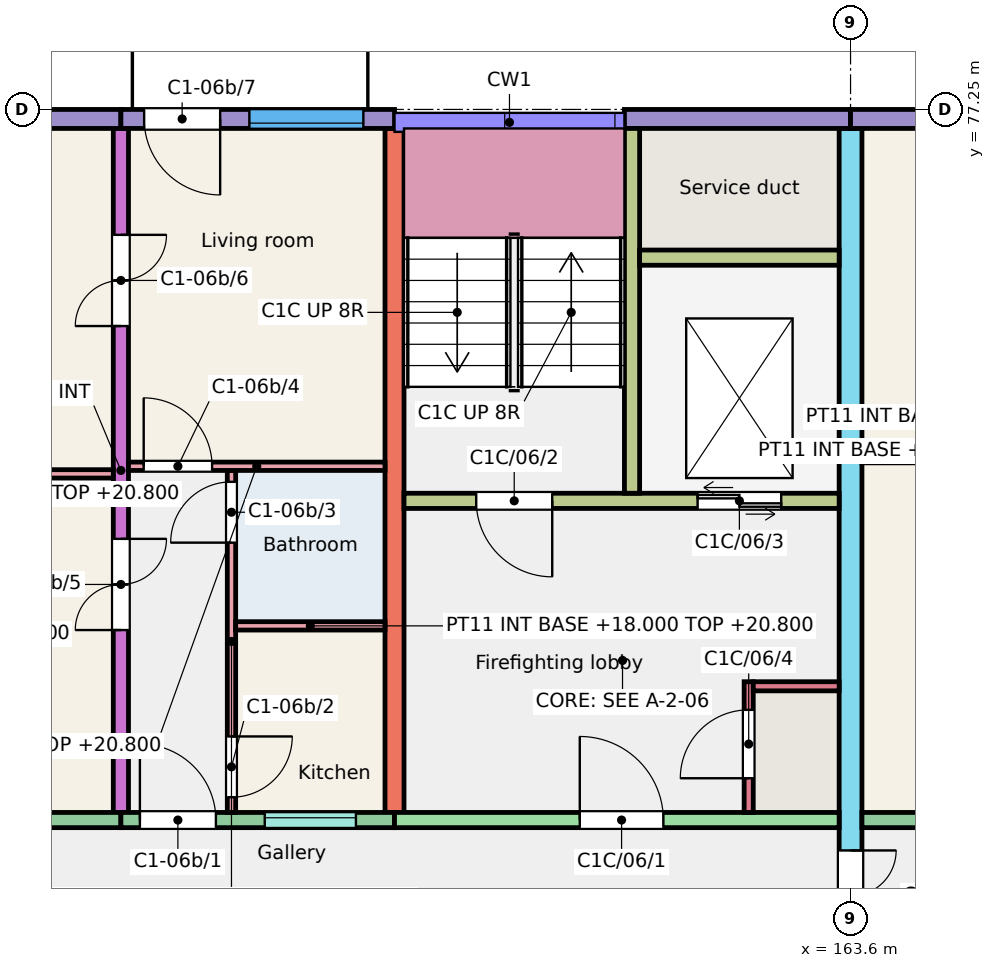
"""IFC4 building model, lengths in metres.
Left out: names, types, materials, properties, quantities, classifications, styles, units other than length and angle.
Written with IfcOpenShell. Run it as: python <this file> out.ifc"""

import sys

from ifc_helpers import new_model, si_unit, direction, frame, frame_2d, origin, place, context, subcontext, project, spatial, rectangle, extrude, element, fill, save


model = new_model("IFC4")
c1 = context("Model", 3, precision=1e-05, world=origin(), true_north=direction((0.0, 1.0)))
c2 = subcontext(c1, "Body", "Model", "MODEL_VIEW")
j1 = project(units=[si_unit("LENGTHUNIT", "METRE"), si_unit("PLANEANGLEUNIT", "RADIAN")], contexts=[c1])
p1 = place(None, origin())
s1 = spatial("IfcSite", under=j1, at=p1, CompositionType="ELEMENT")
p2 = place(p1, origin())
s2 = spatial("IfcBuilding", under=s1, at=p2, CompositionType="ELEMENT")
p3 = place(p2, frame((0.0, 0.0, 18.0)))
s3 = spatial("IfcBuildingStorey", under=s2, at=p3, CompositionType="ELEMENT", Elevation=18.0)
p4 = place(p3, frame((154.0, 68.0, 0.0), z_axis=(0.0, 0.0, 1.0), x_axis=(0.0, 1.0, 0.0)))
e1 = element("IfcWall", 1, at=p4, inside=s3, PredefinedType="SHEAR", context=c2, shape_type="SweptSolid", body=[
    extrude(rectangle(XDim=9.0, YDim=0.2, at=frame_2d((4.5, 0.0))), origin(), (0.0, 0.0, 1.0), 3.0),
])
p5 = place(p4, frame((2.4, 0.0, 0.0)))
e2 = element("IfcOpeningElement", 2, at=p5, cuts=e1, PredefinedType="OPENING", context=c2, shape_type="SweptSolid", body=[
    extrude(rectangle(XDim=1.2, YDim=2.1, at=frame_2d((0.6, 1.05))), frame((0.0, 0.11, 0.0), z_axis=(0.0, -1.0, 0.0), x_axis=(1.0, 0.0, 0.0)), (0.0, 0.0, 1.0), 0.22),
])
p6 = place(p4, frame((6.4, 0.0, 0.0)))
e3 = element("IfcOpeningElement", 3, at=p6, cuts=e1, PredefinedType="OPENING", context=c2, shape_type="SweptSolid", body=[
    extrude(rectangle(XDim=1.2, YDim=2.1, at=frame_2d((0.6, 1.05))), frame((0.0, 0.11, 0.0), z_axis=(0.0, -1.0, 0.0), x_axis=(1.0, 0.0, 0.0)), (0.0, 0.0, 1.0), 0.22),
])
p7 = place(p3, frame((157.6, 68.0, 0.0), z_axis=(0.0, 0.0, 1.0), x_axis=(0.0, 1.0, 0.0)))
e4 = element("IfcWall", 4, at=p7, inside=s3, PredefinedType="SHEAR", context=c2, shape_type="SweptSolid", body=[
    extrude(rectangle(XDim=9.0, YDim=0.25, at=frame_2d((4.5, 0.0))), origin(), (0.0, 0.0, 1.0), 3.0),
])
p8 = place(p3, frame((163.6, 66.0, 0.0), z_axis=(0.0, 0.0, 1.0), x_axis=(0.0, 1.0, 0.0)))
e5 = element("IfcWall", 5, at=p8, inside=s3, PredefinedType="SHEAR", context=c2, shape_type="SweptSolid", body=[
    extrude(rectangle(XDim=11.0, YDim=0.3, at=frame_2d((5.5, 0.0))), origin(), (0.0, 0.0, 1.0), 3.0),
])
p9 = place(p8, frame((0.3, 0.0, 0.0)))
e6 = element("IfcOpeningElement", 6, at=p9, cuts=e5, PredefinedType="OPENING", context=c2, shape_type="SweptSolid", body=[
    extrude(rectangle(XDim=1.2, YDim=2.1, at=frame_2d((0.6, 1.05))), frame((0.0, 0.16, 0.0), z_axis=(0.0, -1.0, 0.0), x_axis=(1.0, 0.0, 0.0)), (0.0, 0.0, 1.0), 0.32),
])
p10 = place(p3, frame((150.4, 77.125, 0.0), z_axis=(0.0, 0.0, 1.0), x_axis=(1.0, 0.0, 0.0)))
e7 = element("IfcWall", 7, at=p10, inside=s3, PredefinedType="SOLIDWALL", context=c2, shape_type="SweptSolid", body=[
    extrude(rectangle(XDim=3.6, YDim=0.25, at=frame_2d((1.8, 0.0))), origin(), (0.0, 0.0, 1.0), 3.0),
])
p11 = place(p10, frame((1.05, 0.0, 0.9)))
e8 = element("IfcOpeningElement", 8, at=p11, cuts=e7, PredefinedType="OPENING", context=c2, shape_type="SweptSolid", body=[
    extrude(rectangle(XDim=1.5, YDim=1.5, at=frame_2d((0.75, 0.75))), frame((0.0, 0.135, 0.0), z_axis=(0.0, -1.0, 0.0), x_axis=(1.0, 0.0, 0.0)), (0.0, 0.0, 1.0), 0.27),
])
p12 = place(p3, frame((150.4, 67.9, 0.0), z_axis=(0.0, 0.0, 1.0), x_axis=(1.0, 0.0, 0.0)))
e9 = element("IfcWall", 9, at=p12, inside=s3, PredefinedType="SOLIDWALL", context=c2, shape_type="SweptSolid", body=[
    extrude(rectangle(XDim=3.6, YDim=0.2, at=frame_2d((1.8, 0.0))), origin(), (0.0, 0.0, 1.0), 3.0),
])
p13 = place(p12, frame((1.05, 0.0, 0.9)))
e10 = element("IfcOpeningElement", 10, at=p13, cuts=e9, PredefinedType="OPENING", context=c2, shape_type="SweptSolid", body=[
    extrude(rectangle(XDim=1.5, YDim=1.5, at=frame_2d((0.75, 0.75))), frame((0.0, 0.11, 0.0), z_axis=(0.0, -1.0, 0.0), x_axis=(1.0, 0.0, 0.0)), (0.0, 0.0, 1.0), 0.22),
])
p14 = place(p3, frame((154.0, 77.125, 0.0), z_axis=(0.0, 0.0, 1.0), x_axis=(1.0, 0.0, 0.0)))
e11 = element("IfcWall", 11, at=p14, inside=s3, PredefinedType="SOLIDWALL", context=c2, shape_type="SweptSolid", body=[
    extrude(rectangle(XDim=3.6, YDim=0.25, at=frame_2d((1.8, 0.0))), origin(), (0.0, 0.0, 1.0), 3.0),
])
p15 = place(p14, frame((1.69, 0.0, 0.9)))
e12 = element("IfcOpeningElement", 12, at=p15, cuts=e11, PredefinedType="OPENING", context=c2, shape_type="SweptSolid", body=[
    extrude(rectangle(XDim=1.5, YDim=1.5, at=frame_2d((0.75, 0.75))), frame((0.0, 0.135, 0.0), z_axis=(0.0, -1.0, 0.0), x_axis=(1.0, 0.0, 0.0)), (0.0, 0.0, 1.0), 0.27),
])
p16 = place(p14, frame((0.306, 0.0, 0.0)))
e13 = element("IfcOpeningElement", 13, at=p16, cuts=e11, PredefinedType="OPENING", context=c2, shape_type="SweptSolid", body=[
    extrude(rectangle(XDim=1.0, YDim=2.1, at=frame_2d((0.5, 1.05))), frame((0.0, 0.135, 0.0), z_axis=(0.0, -1.0, 0.0), x_axis=(1.0, 0.0, 0.0)), (0.0, 0.0, 1.0), 0.27),
])
p17 = place(p3, frame((154.0, 67.9, 0.0), z_axis=(0.0, 0.0, 1.0), x_axis=(1.0, 0.0, 0.0)))
e14 = element("IfcWall", 14, at=p17, inside=s3, PredefinedType="SOLIDWALL", context=c2, shape_type="SweptSolid", body=[
    extrude(rectangle(XDim=3.6, YDim=0.2, at=frame_2d((1.8, 0.0))), origin(), (0.0, 0.0, 1.0), 3.0),
])
p18 = place(p17, frame((1.893, 0.0, 1.1)))
e15 = element("IfcOpeningElement", 15, at=p18, cuts=e14, PredefinedType="OPENING", context=c2, shape_type="SweptSolid", body=[
    extrude(rectangle(XDim=1.2, YDim=1.3, at=frame_2d((0.6, 0.65))), frame((0.0, 0.11, 0.0), z_axis=(0.0, -1.0, 0.0), x_axis=(1.0, 0.0, 0.0)), (0.0, 0.0, 1.0), 0.22),
])
p19 = place(p17, frame((0.25, 0.0, 0.0)))
e16 = element("IfcOpeningElement", 16, at=p19, cuts=e14, PredefinedType="OPENING", context=c2, shape_type="SweptSolid", body=[
    extrude(rectangle(XDim=1.0, YDim=2.1, at=frame_2d((0.5, 1.05))), frame((0.0, 0.11, 0.0), z_axis=(0.0, -1.0, 0.0), x_axis=(1.0, 0.0, 0.0)), (0.0, 0.0, 1.0), 0.22),
])
p20 = place(p3, frame((160.625, 77.125, 0.0), z_axis=(0.0, 0.0, 1.0), x_axis=(1.0, 0.0, 0.0)))
e17 = element("IfcWall", 17, at=p20, inside=s3, PredefinedType="SOLIDWALL", context=c2, shape_type="SweptSolid", body=[
    extrude(rectangle(XDim=2.975, YDim=0.25, at=frame_2d((1.488, 0.0))), origin(), (0.0, 0.0, 1.0), 3.0),
])
p21 = place(p3, frame((157.6, 67.9, 0.0), z_axis=(0.0, 0.0, 1.0), x_axis=(1.0, 0.0, 0.0)))
e18 = element("IfcWall", 18, at=p21, inside=s3, PredefinedType="SHEAR", context=c2, shape_type="SweptSolid", body=[
    extrude(rectangle(XDim=5.85, YDim=0.2, at=frame_2d((2.925, 0.0))), origin(), (0.0, 0.0, 1.0), 3.0),
])
p22 = place(p21, frame((2.438, 0.0, 0.0)))
e19 = element("IfcOpeningElement", 19, at=p22, cuts=e18, PredefinedType="OPENING", context=c2, shape_type="SweptSolid", body=[
    extrude(rectangle(XDim=1.1, YDim=2.1, at=frame_2d((0.55, 1.05))), frame((0.0, 0.11, 0.0), z_axis=(0.0, -1.0, 0.0), x_axis=(1.0, 0.0, 0.0)), (0.0, 0.0, 1.0), 0.22),
])
p23 = place(p3, frame((157.725, 72.1, 0.0), z_axis=(0.0, 0.0, 1.0), x_axis=(1.0, 0.0, 0.0)))
e20 = element("IfcWall", 20, at=p23, inside=s3, PredefinedType="SHEAR", context=c2, shape_type="SweptSolid", body=[
    extrude(rectangle(XDim=5.725, YDim=0.2, at=frame_2d((2.862, 0.0))), origin(), (0.0, 0.0, 1.0), 3.0),
])
p24 = place(p23, frame((0.95, 0.0, 0.0)))
e21 = element("IfcOpeningElement", 21, at=p24, cuts=e20, PredefinedType="OPENING", context=c2, shape_type="SweptSolid", body=[
    extrude(rectangle(XDim=1.0, YDim=2.1, at=frame_2d((0.5, 1.05))), frame((0.0, 0.11, 0.0), z_axis=(0.0, -1.0, 0.0), x_axis=(1.0, 0.0, 0.0)), (0.0, 0.0, 1.0), 0.22),
])
p25 = place(p23, frame((3.863, 0.0, 0.0)))
e22 = element("IfcOpeningElement", 22, at=p25, cuts=e20, PredefinedType="OPENING", context=c2, shape_type="SweptSolid", body=[
    extrude(rectangle(XDim=1.1, YDim=2.1, at=frame_2d((0.55, 1.05))), frame((0.0, 0.11, 0.0), z_axis=(0.0, -1.0, 0.0), x_axis=(1.0, 0.0, 0.0)), (0.0, 0.0, 1.0), 0.22),
])
p26 = place(p3, frame((160.725, 72.2, 0.0), z_axis=(0.0, 0.0, 1.0), x_axis=(0.0, 1.0, 0.0)))
e23 = element("IfcWall", 23, at=p26, inside=s3, PredefinedType="SHEAR", context=c2, shape_type="SweptSolid", body=[
    extrude(rectangle(XDim=4.8, YDim=0.2, at=frame_2d((2.4, 0.0))), origin(), (0.0, 0.0, 1.0), 3.0),
])
p27 = place(p3, frame((160.825, 75.3, 0.0), z_axis=(0.0, 0.0, 1.0), x_axis=(1.0, 0.0, 0.0)))
e24 = element("IfcWall", 24, at=p27, inside=s3, PredefinedType="SHEAR", context=c2, shape_type="SweptSolid", body=[
    extrude(rectangle(XDim=2.625, YDim=0.2, at=frame_2d((1.312, 0.0))), origin(), (0.0, 0.0, 1.0), 3.0),
])
p28 = place(p3, frame((162.26, 68.0, 0.0), z_axis=(0.0, 0.0, 1.0), x_axis=(0.0, 1.0, 0.0)))
e25 = element("IfcWall", 25, at=p28, inside=s3, PredefinedType="SHEAR", context=c2, shape_type="SweptSolid", body=[
    extrude(rectangle(XDim=1.72, YDim=0.12, at=frame_2d((0.86, 0.0))), origin(), (0.0, 0.0, 1.0), 3.0),
])
p29 = place(p28, frame((0.45, 0.0, 0.0)))
e26 = element("IfcOpeningElement", 26, at=p29, cuts=e25, PredefinedType="OPENING", context=c2, shape_type="SweptSolid", body=[
    extrude(rectangle(XDim=0.9, YDim=2.1, at=frame_2d((0.45, 1.05))), frame((0.0, 0.07, 0.0), z_axis=(0.0, -1.0, 0.0), x_axis=(1.0, 0.0, 0.0)), (0.0, 0.0, 1.0), 0.14),
])
p30 = place(p3, frame((162.32, 69.66, 0.0), z_axis=(0.0, 0.0, 1.0), x_axis=(1.0, 0.0, 0.0)))
e27 = element("IfcWall", 27, at=p30, inside=s3, PredefinedType="SHEAR", context=c2, shape_type="SweptSolid", body=[
    extrude(rectangle(XDim=1.13, YDim=0.12, at=frame_2d((0.565, 0.0))), origin(), (0.0, 0.0, 1.0), 3.0),
])
p31 = place(p3, frame((163.6, 77.125, 0.0), z_axis=(0.0, 0.0, 1.0), x_axis=(1.0, 0.0, 0.0)))
e28 = element("IfcWall", 28, at=p31, inside=s3, PredefinedType="SOLIDWALL", context=c2, shape_type="SweptSolid", body=[
    extrude(rectangle(XDim=3.6, YDim=0.25, at=frame_2d((1.8, 0.0))), origin(), (0.0, 0.0, 1.0), 3.0),
])
p32 = place(p31, frame((1.075, 0.0, 0.9)))
e29 = element("IfcOpeningElement", 29, at=p32, cuts=e28, PredefinedType="OPENING", context=c2, shape_type="SweptSolid", body=[
    extrude(rectangle(XDim=1.5, YDim=1.5, at=frame_2d((0.75, 0.75))), frame((0.0, 0.135, 0.0), z_axis=(0.0, -1.0, 0.0), x_axis=(1.0, 0.0, 0.0)), (0.0, 0.0, 1.0), 0.27),
])
p33 = place(p3, frame((163.75, 67.9, 0.0), z_axis=(0.0, 0.0, 1.0), x_axis=(1.0, 0.0, 0.0)))
e30 = element("IfcWall", 30, at=p33, inside=s3, PredefinedType="SOLIDWALL", context=c2, shape_type="SweptSolid", body=[
    extrude(rectangle(XDim=3.45, YDim=0.2, at=frame_2d((1.725, 0.0))), origin(), (0.0, 0.0, 1.0), 3.0),
])
p34 = place(p33, frame((0.925, 0.0, 0.9)))
e31 = element("IfcOpeningElement", 31, at=p34, cuts=e30, PredefinedType="OPENING", context=c2, shape_type="SweptSolid", body=[
    extrude(rectangle(XDim=1.5, YDim=1.5, at=frame_2d((0.75, 0.75))), frame((0.0, 0.11, 0.0), z_axis=(0.0, -1.0, 0.0), x_axis=(1.0, 0.0, 0.0)), (0.0, 0.0, 1.0), 0.22),
])
p35 = place(p3, frame((155.455, 68.0, 0.0), z_axis=(0.0, 0.0, 1.0), x_axis=(0.0, 1.0, 0.0)))
e32 = element("IfcWall", 32, at=p35, inside=s3, PredefinedType="PARTITIONING", context=c2, shape_type="SweptSolid", body=[
    extrude(rectangle(XDim=4.5, YDim=0.11, at=frame_2d((2.25, 0.0))), origin(), (0.0, 0.0, 1.0), 2.8),
])
p36 = place(p35, frame((0.2, 0.0, 0.0)))
e33 = element("IfcOpeningElement", 33, at=p36, cuts=e32, PredefinedType="OPENING", context=c2, shape_type="SweptSolid", body=[
    extrude(rectangle(XDim=0.8, YDim=2.1, at=frame_2d((0.4, 1.05))), frame((0.0, 0.065, 0.0), z_axis=(0.0, -1.0, 0.0), x_axis=(1.0, 0.0, 0.0)), (0.0, 0.0, 1.0), 0.13),
])
p37 = place(p35, frame((3.55, 0.0, 0.0)))
e34 = element("IfcOpeningElement", 34, at=p37, cuts=e32, PredefinedType="OPENING", context=c2, shape_type="SweptSolid", body=[
    extrude(rectangle(XDim=0.8, YDim=2.1, at=frame_2d((0.4, 1.05))), frame((0.0, 0.065, 0.0), z_axis=(0.0, -1.0, 0.0), x_axis=(1.0, 0.0, 0.0)), (0.0, 0.0, 1.0), 0.13),
])
p38 = place(p3, frame((155.51, 70.455, 0.0), z_axis=(0.0, 0.0, 1.0), x_axis=(1.0, 0.0, 0.0)))
e35 = element("IfcWall", 35, at=p38, inside=s3, PredefinedType="PARTITIONING", context=c2, shape_type="SweptSolid", body=[
    extrude(rectangle(XDim=1.965, YDim=0.11, at=frame_2d((0.982, 0.0))), origin(), (0.0, 0.0, 1.0), 2.8),
])
p39 = place(p3, frame((154.1, 72.555, 0.0), z_axis=(0.0, 0.0, 1.0), x_axis=(1.0, 0.0, 0.0)))
e36 = element("IfcWall", 36, at=p39, inside=s3, PredefinedType="PARTITIONING", context=c2, shape_type="SweptSolid", body=[
    extrude(rectangle(XDim=3.375, YDim=0.11, at=frame_2d((1.688, 0.0))), origin(), (0.0, 0.0, 1.0), 2.8),
])
p40 = place(p39, frame((0.2, 0.0, 0.0)))
e37 = element("IfcOpeningElement", 37, at=p40, cuts=e36, PredefinedType="OPENING", context=c2, shape_type="SweptSolid", body=[
    extrude(rectangle(XDim=0.9, YDim=2.1, at=frame_2d((0.45, 1.05))), frame((0.0, 0.065, 0.0), z_axis=(0.0, -1.0, 0.0), x_axis=(1.0, 0.0, 0.0)), (0.0, 0.0, 1.0), 0.13),
])
p41 = place(p3, frame((150.5, 72.455, 0.0), z_axis=(0.0, 0.0, 1.0), x_axis=(1.0, 0.0, 0.0)))
e38 = element("IfcWall", 38, at=p41, inside=s3, PredefinedType="PARTITIONING", context=c2, shape_type="SweptSolid", body=[
    extrude(rectangle(XDim=3.4, YDim=0.11, at=frame_2d((1.7, 0.0))), origin(), (0.0, 0.0, 1.0), 2.8),
])
p42 = place(p3, frame((163.75, 72.655, 0.0), z_axis=(0.0, 0.0, 1.0), x_axis=(1.0, 0.0, 0.0)))
e39 = element("IfcWall", 39, at=p42, inside=s3, PredefinedType="PARTITIONING", context=c2, shape_type="SweptSolid", body=[
    extrude(rectangle(XDim=3.35, YDim=0.11, at=frame_2d((1.675, 0.0))), origin(), (0.0, 0.0, 1.0), 2.75),
])
p43 = place(p18, origin())
e40 = element("IfcWindow", 40, at=p43, inside=s3, PartitioningType="SINGLE_PANEL", PredefinedType="WINDOW", context=c2, shape_type="SweptSolid", body=[
    extrude(rectangle(XDim=1.2, YDim=1.3, at=frame_2d((0.6, 0.65))), frame((0.0, 0.06, 0.0), z_axis=(0.0, -1.0, 0.0), x_axis=(1.0, 0.0, 0.0)), (0.0, 0.0, 1.0), 0.06),
])
fill(e15, e40)
p44 = place(p15, origin())
e41 = element("IfcWindow", 41, at=p44, inside=s3, PartitioningType="SINGLE_PANEL", PredefinedType="WINDOW", context=c2, shape_type="SweptSolid", body=[
    extrude(rectangle(XDim=1.5, YDim=1.5, at=frame_2d((0.75, 0.75))), frame((0.0, -0.025, 0.0), z_axis=(0.0, -1.0, 0.0), x_axis=(1.0, 0.0, 0.0)), (0.0, 0.0, 1.0), 0.06),
])
fill(e12, e41)
p45 = place(p19, origin())
e42 = element("IfcDoor", 42, at=p45, inside=s3, OperationType="SINGLE_SWING_LEFT", PredefinedType="DOOR", context=c2, shape_type="SweptSolid", body=[
    extrude(rectangle(XDim=1.0, YDim=2.1, at=frame_2d((0.5, 1.05))), frame((0.0, 0.025, 0.0), z_axis=(0.0, -1.0, 0.0), x_axis=(1.0, 0.0, 0.0)), (0.0, 0.0, 1.0), 0.05),
])
fill(e16, e42)
p46 = place(p36, origin())
e43 = element("IfcDoor", 43, at=p46, inside=s3, OperationType="SINGLE_SWING_RIGHT", PredefinedType="DOOR", context=c2, shape_type="SweptSolid", body=[
    extrude(rectangle(XDim=0.8, YDim=2.1, at=frame_2d((0.4, 1.05))), frame((0.0, 0.025, 0.0), z_axis=(0.0, -1.0, 0.0), x_axis=(1.0, 0.0, 0.0)), (0.0, 0.0, 1.0), 0.05),
])
fill(e33, e43)
p47 = place(p37, origin())
e44 = element("IfcDoor", 44, at=p47, inside=s3, OperationType="SINGLE_SWING_LEFT", PredefinedType="DOOR", context=c2, shape_type="SweptSolid", body=[
    extrude(rectangle(XDim=0.8, YDim=2.1, at=frame_2d((0.4, 1.05))), frame((0.0, 0.025, 0.0), z_axis=(0.0, -1.0, 0.0), x_axis=(1.0, 0.0, 0.0)), (0.0, 0.0, 1.0), 0.05),
])
fill(e34, e44)
p48 = place(p40, origin())
e45 = element("IfcDoor", 45, at=p48, inside=s3, OperationType="SINGLE_SWING_LEFT", PredefinedType="DOOR", context=c2, shape_type="SweptSolid", body=[
    extrude(rectangle(XDim=0.9, YDim=2.1, at=frame_2d((0.45, 1.05))), frame((0.0, 0.025, 0.0), z_axis=(0.0, -1.0, 0.0), x_axis=(1.0, 0.0, 0.0)), (0.0, 0.0, 1.0), 0.05),
])
fill(e37, e45)
p49 = place(p5, origin())
e46 = element("IfcDoor", 46, at=p49, inside=s3, OperationType="DOUBLE_DOOR_SINGLE_SWING", PredefinedType="DOOR", context=c2, shape_type="SweptSolid", body=[
    extrude(rectangle(XDim=1.2, YDim=2.1, at=frame_2d((0.6, 1.05))), frame((0.0, 0.025, 0.0), z_axis=(0.0, -1.0, 0.0), x_axis=(1.0, 0.0, 0.0)), (0.0, 0.0, 1.0), 0.05),
])
fill(e2, e46)
p50 = place(p6, origin())
e47 = element("IfcDoor", 47, at=p50, inside=s3, OperationType="DOUBLE_DOOR_SINGLE_SWING", PredefinedType="DOOR", context=c2, shape_type="SweptSolid", body=[
    extrude(rectangle(XDim=1.2, YDim=2.1, at=frame_2d((0.6, 1.05))), frame((0.0, 0.025, 0.0), z_axis=(0.0, -1.0, 0.0), x_axis=(1.0, 0.0, 0.0)), (0.0, 0.0, 1.0), 0.05),
])
fill(e3, e47)
p51 = place(p16, origin())
e48 = element("IfcDoor", 48, at=p51, inside=s3, OperationType="SINGLE_SWING_RIGHT", PredefinedType="DOOR", context=c2, shape_type="SweptSolid", body=[
    extrude(rectangle(XDim=1.0, YDim=2.1, at=frame_2d((0.5, 1.05))), frame((0.0, 0.025, 0.0), z_axis=(0.0, -1.0, 0.0), x_axis=(1.0, 0.0, 0.0)), (0.0, 0.0, 1.0), 0.05),
])
fill(e13, e48)
p52 = place(p22, origin())
e49 = element("IfcDoor", 49, at=p52, inside=s3, OperationType="SINGLE_SWING_LEFT", PredefinedType="DOOR", context=c2, shape_type="SweptSolid", body=[
    extrude(rectangle(XDim=1.1, YDim=2.1, at=frame_2d((0.55, 1.05))), frame((0.0, 0.025, 0.0), z_axis=(0.0, -1.0, 0.0), x_axis=(1.0, 0.0, 0.0)), (0.0, 0.0, 1.0), 0.05),
])
fill(e19, e49)
p53 = place(p24, origin())
e50 = element("IfcDoor", 50, at=p53, inside=s3, OperationType="SINGLE_SWING_RIGHT", PredefinedType="DOOR", context=c2, shape_type="SweptSolid", body=[
    extrude(rectangle(XDim=1.0, YDim=2.1, at=frame_2d((0.5, 1.05))), frame((0.0, 0.025, 0.0), z_axis=(0.0, -1.0, 0.0), x_axis=(1.0, 0.0, 0.0)), (0.0, 0.0, 1.0), 0.05),
])
fill(e21, e50)
p54 = place(p25, origin())
e51 = element("IfcDoor", 51, at=p54, inside=s3, OperationType="DOUBLE_DOOR_SLIDING", PredefinedType="DOOR", context=c2, shape_type="SweptSolid", body=[
    extrude(rectangle(XDim=1.1, YDim=2.1, at=frame_2d((0.55, 1.05))), frame((0.0, 0.025, 0.0), z_axis=(0.0, -1.0, 0.0), x_axis=(1.0, 0.0, 0.0)), (0.0, 0.0, 1.0), 0.05),
])
fill(e22, e51)
p55 = place(p29, origin())
e52 = element("IfcDoor", 52, at=p55, inside=s3, OperationType="SINGLE_SWING_LEFT", PredefinedType="DOOR", context=c2, shape_type="SweptSolid", body=[
    extrude(rectangle(XDim=0.9, YDim=2.1, at=frame_2d((0.45, 1.05))), frame((0.0, 0.025, 0.0), z_axis=(0.0, -1.0, 0.0), x_axis=(1.0, 0.0, 0.0)), (0.0, 0.0, 1.0), 0.05),
])
fill(e26, e52)
p56 = place(p9, origin())
e53 = element("IfcDoor", 53, at=p56, inside=s3, OperationType="DOUBLE_DOOR_SINGLE_SWING", PredefinedType="DOOR", context=c2, shape_type="SweptSolid", body=[
    extrude(rectangle(XDim=1.2, YDim=2.1, at=frame_2d((0.6, 1.05))), frame((0.0, 0.025, 0.0), z_axis=(0.0, -1.0, 0.0), x_axis=(1.0, 0.0, 0.0)), (0.0, 0.0, 1.0), 0.05),
])
fill(e6, e53)
save(model, sys.argv[1])
